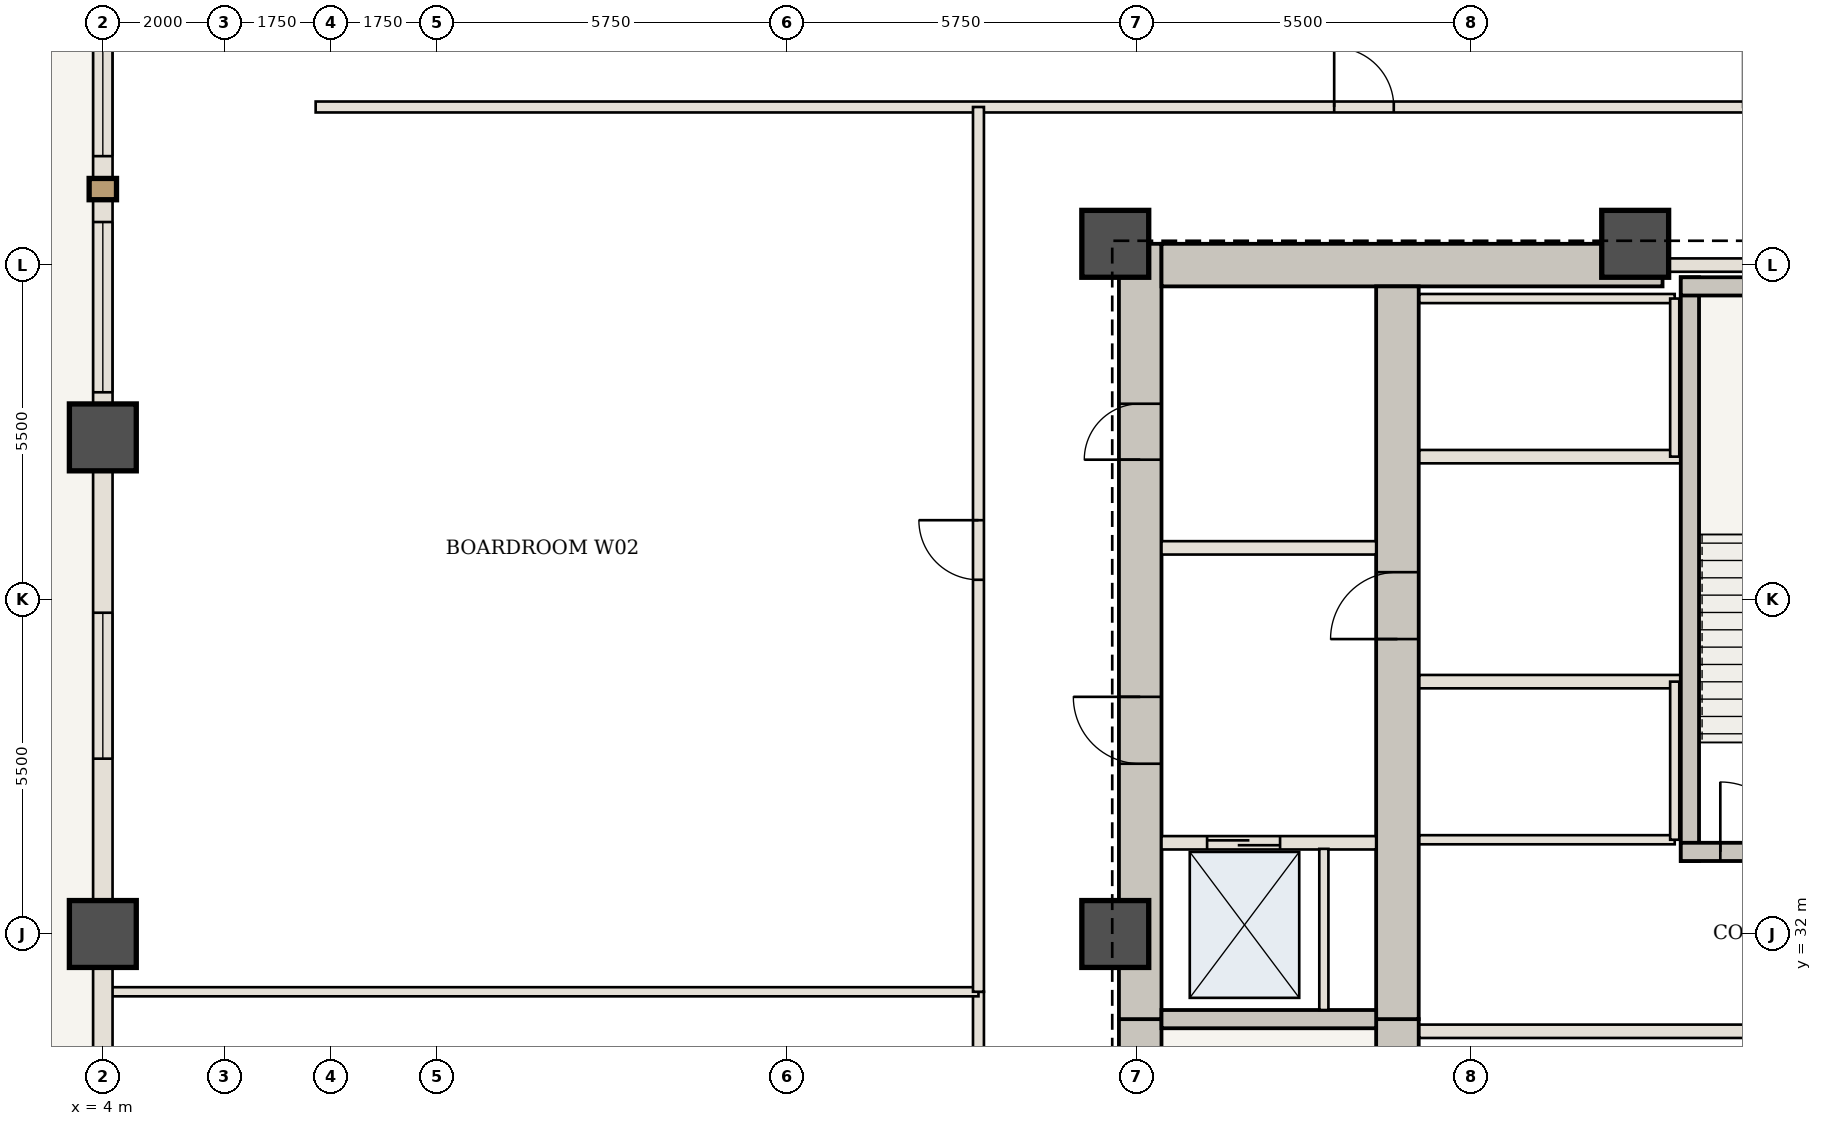
"""IFC4 building model, lengths in metres.
Left out: names, types, materials, properties, quantities, classifications, styles, units other than length and angle.
Written with IfcOpenShell. Run it as: python <this file> out.ifc"""

import sys

from ifc_helpers import new_model, si_unit, direction, frame, frame_2d, origin, origin_2d, place, context, subcontext, project, spatial, rectangle, extrude, element, fill, save


model = new_model("IFC4")
c1 = context("Model", 3, precision=1e-05, world=origin(), true_north=direction((0.0, 1.0)))
c2 = subcontext(c1, "Body", "Model", "MODEL_VIEW")
j1 = project(units=[si_unit("LENGTHUNIT", "METRE"), si_unit("PLANEANGLEUNIT", "RADIAN")], contexts=[c1])
p1 = place(None, origin())
s1 = spatial("IfcSite", under=j1, at=p1, CompositionType="ELEMENT")
p2 = place(p1, origin())
s2 = spatial("IfcBuilding", under=s1, at=p2, CompositionType="ELEMENT")
p3 = place(p2, frame((0.0, 0.0, 34.3)))
s3 = spatial("IfcBuildingStorey", under=s2, at=p3, CompositionType="ELEMENT", Elevation=34.3)
p4 = place(p3, frame((21.06, 20.6, 0.0), z_axis=(0.0, 0.0, 1.0), x_axis=(0.0, 1.0, 0.0)))
e1 = element("IfcWall", 1, at=p4, inside=s3, PredefinedType="SHEAR", context=c2, shape_type="SweptSolid", body=[
    extrude(rectangle(XDim=10.0, YDim=0.7, at=frame_2d((5.0, 0.0))), origin(), (0.0, 0.0, 1.0), 4.55),
])
p5 = place(p4, frame((1.15, 0.0, 0.0)))
e2 = element("IfcOpeningElement", 2, at=p5, cuts=e1, PredefinedType="OPENING", context=c2, shape_type="SweptSolid", body=[
    extrude(rectangle(XDim=1.15, YDim=2.15, at=frame_2d((0.575, 1.075))), frame((0.0, 0.36, 0.0), z_axis=(0.0, -1.0, 0.0), x_axis=(1.0, 0.0, 0.0)), (0.0, 0.0, 1.0), 0.72),
])
p6 = place(p3, frame((21.06, 30.6, 0.0), z_axis=(0.0, 0.0, 1.0), x_axis=(0.0, 1.0, 0.0)))
e3 = element("IfcWall", 3, at=p6, inside=s3, PredefinedType="SHEAR", context=c2, shape_type="SweptSolid", body=[
    extrude(rectangle(XDim=12.75, YDim=0.7, at=frame_2d((6.375, 0.0))), origin(), (0.0, 0.0, 1.0), 4.55),
])
p7 = place(p6, frame((4.2, 0.0, 0.0)))
e4 = element("IfcOpeningElement", 4, at=p7, cuts=e3, PredefinedType="OPENING", context=c2, shape_type="SweptSolid", body=[
    extrude(rectangle(XDim=1.1, YDim=2.15, at=frame_2d((0.55, 1.075))), frame((0.0, 0.36, 0.0), z_axis=(0.0, -1.0, 0.0), x_axis=(1.0, 0.0, 0.0)), (0.0, 0.0, 1.0), 0.72),
])
p8 = place(p6, frame((9.2, 0.0, 0.0)))
e5 = element("IfcOpeningElement", 5, at=p8, cuts=e3, PredefinedType="OPENING", context=c2, shape_type="SweptSolid", body=[
    extrude(rectangle(XDim=0.92, YDim=2.1, at=frame_2d((0.46, 1.05))), frame((0.0, 0.36, 0.0), z_axis=(0.0, -1.0, 0.0), x_axis=(1.0, 0.0, 0.0)), (0.0, 0.0, 1.0), 0.72),
])
p9 = place(p3, frame((21.41, 43.0, 0.0), z_axis=(0.0, 0.0, 1.0), x_axis=(1.0, 0.0, 0.0)))
e6 = element("IfcWall", 6, at=p9, inside=s3, PredefinedType="SHEAR", context=c2, shape_type="SweptSolid", body=[
    extrude(rectangle(XDim=8.24, YDim=0.7, at=frame_2d((4.12, 0.0))), origin(), (0.0, 0.0, 1.0), 4.55),
])
p10 = place(p3, frame((25.29, 21.3, 0.0), z_axis=(0.0, 0.0, 1.0), x_axis=(0.0, 1.0, 0.0)))
e7 = element("IfcWall", 7, at=p10, inside=s3, PredefinedType="SHEAR", context=c2, shape_type="SweptSolid", body=[
    extrude(rectangle(XDim=9.3, YDim=0.7, at=frame_2d((4.65, 0.0))), origin(), (0.0, 0.0, 1.0), 4.55),
])
p11 = place(p3, frame((25.29, 30.6, 0.0), z_axis=(0.0, 0.0, 1.0), x_axis=(0.0, 1.0, 0.0)))
e8 = element("IfcWall", 8, at=p11, inside=s3, PredefinedType="SHEAR", context=c2, shape_type="SweptSolid", body=[
    extrude(rectangle(XDim=12.05, YDim=0.7, at=frame_2d((6.025, 0.0))), origin(), (0.0, 0.0, 1.0), 4.55),
])
p12 = place(p11, frame((6.25, 0.0, 0.0)))
e9 = element("IfcOpeningElement", 9, at=p12, cuts=e8, PredefinedType="OPENING", context=c2, shape_type="SweptSolid", body=[
    extrude(rectangle(XDim=1.1, YDim=2.15, at=frame_2d((0.55, 1.075))), frame((0.0, 0.36, 0.0), z_axis=(0.0, -1.0, 0.0), x_axis=(1.0, 0.0, 0.0)), (0.0, 0.0, 1.0), 0.72),
])
for number, where, z_axis, x_axis in (
    (10, (29.2, 43.35, 0.0), (0.0, 0.0, 1.0), (1.0, 0.0, 0.0)),
    (11, (20.65, 43.35, 0.0), (0.0, 0.0, 1.0), (1.0, 0.0, 0.0)),
    (12, (20.65, 32.0, 0.0), (0.0, 0.0, 1.0), (1.0, 0.0, 0.0)),
):
    element("IfcColumn", number, at=place(p3, frame(where, z_axis=z_axis, x_axis=x_axis)), inside=s3, PredefinedType="COLUMN", context=c2, shape_type="SweptSolid", body=[
        extrude(rectangle(XDim=1.1, YDim=1.1, at=origin_2d()), origin(), (0.0, 0.0, 1.0), 4.55),
    ])
for number, where, z_axis, x_axis in (
    (13, (4.0, 32.0, -0.42), (0.0, 0.0, 1.0), (1.0, 0.0, 0.0)),
    (14, (4.0, 40.167, -0.42), (0.0, 0.0, 1.0), (1.0, 0.0, 0.0)),
):
    element("IfcColumn", number, at=place(p3, frame(where, z_axis=z_axis, x_axis=x_axis)), inside=s3, PredefinedType="COLUMN", context=c2, shape_type="SweptSolid", body=[
        extrude(rectangle(XDim=1.1, YDim=1.1, at=origin_2d()), origin(), (0.0, 0.0, 1.0), 4.97),
    ])
p13 = place(p3, frame((21.41, 30.6, 0.0), z_axis=(0.0, 0.0, 1.0), x_axis=(1.0, 0.0, 0.0)))
e15 = element("IfcWall", 15, at=p13, inside=s3, PredefinedType="SHEAR", context=c2, shape_type="SweptSolid", body=[
    extrude(rectangle(XDim=3.53, YDim=0.3, at=frame_2d((1.765, 0.0))), origin(), (0.0, 0.0, 1.0), 4.13),
])
p14 = place(p3, frame((21.41, 33.5, 0.0), z_axis=(0.0, 0.0, 1.0), x_axis=(1.0, 0.0, 0.0)))
e16 = element("IfcWall", 16, at=p14, inside=s3, PredefinedType="STANDARD", context=c2, shape_type="SweptSolid", body=[
    extrude(rectangle(XDim=3.53, YDim=0.22, at=frame_2d((1.765, 0.0))), origin(), (0.0, 0.0, 1.0), 4.13),
])
p15 = place(p14, frame((0.75, 0.0, 0.0)))
e17 = element("IfcOpeningElement", 17, at=p15, cuts=e16, PredefinedType="OPENING", context=c2, shape_type="SweptSolid", body=[
    extrude(rectangle(XDim=1.2, YDim=2.2, at=frame_2d((0.6, 1.1))), frame((0.0, 0.12, 0.0), z_axis=(0.0, -1.0, 0.0), x_axis=(1.0, 0.0, 0.0)), (0.0, 0.0, 1.0), 0.24),
])
p16 = place(p3, frame((24.08, 30.75, 0.0), z_axis=(0.0, 0.0, 1.0), x_axis=(0.0, 1.0, 0.0)))
e18 = element("IfcWall", 18, at=p16, inside=s3, PredefinedType="STANDARD", context=c2, shape_type="SweptSolid", body=[
    extrude(rectangle(XDim=2.65, YDim=0.15, at=frame_2d((1.325, 0.0))), origin(), (0.0, 0.0, 1.0), 4.13),
])
p17 = place(p3, frame((21.41, 38.35, 0.0), z_axis=(0.0, 0.0, 1.0), x_axis=(1.0, 0.0, 0.0)))
e19 = element("IfcWall", 19, at=p17, inside=s3, PredefinedType="STANDARD", context=c2, shape_type="SweptSolid", body=[
    extrude(rectangle(XDim=3.53, YDim=0.22, at=frame_2d((1.765, 0.0))), origin(), (0.0, 0.0, 1.0), 4.13),
])
p18 = place(p3, frame((25.65, 30.4, 0.0), z_axis=(0.0, 0.0, 1.0), x_axis=(1.0, 0.0, 0.0)))
e20 = element("IfcWall", 20, at=p18, inside=s3, PredefinedType="STANDARD", context=c2, shape_type="SweptSolid", body=[
    extrude(rectangle(XDim=9.25, YDim=0.22, at=frame_2d((4.625, 0.0))), origin(), (0.0, 0.0, 1.0), 4.13),
])
p19 = place(p3, frame((25.65, 36.15, 0.0), z_axis=(0.0, 0.0, 1.0), x_axis=(1.0, 0.0, 0.0)))
e21 = element("IfcWall", 21, at=p19, inside=s3, PredefinedType="STANDARD", context=c2, shape_type="SweptSolid", body=[
    extrude(rectangle(XDim=4.3, YDim=0.22, at=frame_2d((2.15, 0.0))), origin(), (0.0, 0.0, 1.0), 4.13),
])
p20 = place(p3, frame((25.65, 33.55, 0.0), z_axis=(0.0, 0.0, 1.0), x_axis=(1.0, 0.0, 0.0)))
e22 = element("IfcWall", 22, at=p20, inside=s3, PredefinedType="STANDARD", context=c2, shape_type="SweptSolid", body=[
    extrude(rectangle(XDim=4.2, YDim=0.15, at=frame_2d((2.1, 0.0))), origin(), (0.0, 0.0, 1.0), 4.13),
])
p21 = place(p3, frame((29.85, 33.55, 0.0), z_axis=(0.0, 0.0, 1.0), x_axis=(0.0, 1.0, 0.0)))
e23 = element("IfcWall", 23, at=p21, inside=s3, PredefinedType="STANDARD", context=c2, shape_type="SweptSolid", body=[
    extrude(rectangle(XDim=2.6, YDim=0.15, at=frame_2d((1.3, 0.0))), origin(), (0.0, 0.0, 1.0), 4.13),
])
p22 = place(p3, frame((25.65, 39.85, 0.0), z_axis=(0.0, 0.0, 1.0), x_axis=(1.0, 0.0, 0.0)))
e24 = element("IfcWall", 24, at=p22, inside=s3, PredefinedType="STANDARD", context=c2, shape_type="SweptSolid", body=[
    extrude(rectangle(XDim=4.3, YDim=0.22, at=frame_2d((2.15, 0.0))), origin(), (0.0, 0.0, 1.0), 4.13),
])
p23 = place(p3, frame((25.65, 42.45, 0.0), z_axis=(0.0, 0.0, 1.0), x_axis=(1.0, 0.0, 0.0)))
e25 = element("IfcWall", 25, at=p23, inside=s3, PredefinedType="STANDARD", context=c2, shape_type="SweptSolid", body=[
    extrude(rectangle(XDim=4.2, YDim=0.15, at=frame_2d((2.1, 0.0))), origin(), (0.0, 0.0, 1.0), 4.13),
])
p24 = place(p3, frame((29.85, 39.85, 0.0), z_axis=(0.0, 0.0, 1.0), x_axis=(0.0, 1.0, 0.0)))
e26 = element("IfcWall", 26, at=p24, inside=s3, PredefinedType="STANDARD", context=c2, shape_type="SweptSolid", body=[
    extrude(rectangle(XDim=2.6, YDim=0.15, at=frame_2d((1.3, 0.0))), origin(), (0.0, 0.0, 1.0), 4.13),
])
p25 = place(p3, frame((30.1, 33.2, 0.0), z_axis=(0.0, 0.0, 1.0), x_axis=(0.0, 1.0, 0.0)))
e27 = element("IfcWall", 27, at=p25, inside=s3, PredefinedType="SHEAR", context=c2, shape_type="SweptSolid", body=[
    extrude(rectangle(XDim=9.6, YDim=0.3, at=frame_2d((4.8, 0.0))), origin(), (0.0, 0.0, 1.0), 4.13),
])
p26 = place(p3, frame((29.95, 33.35, 0.0), z_axis=(0.0, 0.0, 1.0), x_axis=(1.0, 0.0, 0.0)))
e28 = element("IfcWall", 28, at=p26, inside=s3, PredefinedType="SHEAR", context=c2, shape_type="SweptSolid", body=[
    extrude(rectangle(XDim=4.05, YDim=0.3, at=frame_2d((2.025, 0.0))), origin(), (0.0, 0.0, 1.0), 4.13),
])
p27 = place(p26, frame((0.65, 0.0, 0.0)))
e29 = element("IfcOpeningElement", 29, at=p27, cuts=e28, PredefinedType="OPENING", context=c2, shape_type="SweptSolid", body=[
    extrude(rectangle(XDim=1.15, YDim=2.15, at=frame_2d((0.575, 1.075))), frame((0.0, 0.16, 0.0), z_axis=(0.0, -1.0, 0.0), x_axis=(1.0, 0.0, 0.0)), (0.0, 0.0, 1.0), 0.32),
])
p28 = place(p3, frame((29.95, 42.65, 0.0), z_axis=(0.0, 0.0, 1.0), x_axis=(1.0, 0.0, 0.0)))
e30 = element("IfcWall", 30, at=p28, inside=s3, PredefinedType="SHEAR", context=c2, shape_type="SweptSolid", body=[
    extrude(rectangle(XDim=4.05, YDim=0.3, at=frame_2d((2.025, 0.0))), origin(), (0.0, 0.0, 1.0), 4.13),
])
p29 = place(p3, frame((29.65, 43.0, 0.0), z_axis=(0.0, 0.0, 1.0), x_axis=(1.0, 0.0, 0.0)))
e31 = element("IfcWall", 31, at=p29, inside=s3, PredefinedType="STANDARD", context=c2, shape_type="SweptSolid", body=[
    extrude(rectangle(XDim=8.1, YDim=0.22, at=frame_2d((4.05, 0.0))), origin(), (0.0, 0.0, 1.0), 4.13),
])
p30 = place(p29, frame((5.95, 0.0, 0.0)))
e32 = element("IfcOpeningElement", 32, at=p30, cuts=e31, PredefinedType="OPENING", context=c2, shape_type="SweptSolid", body=[
    extrude(rectangle(XDim=1.1, YDim=2.15, at=frame_2d((0.55, 1.075))), frame((0.0, 0.12, 0.0), z_axis=(0.0, -1.0, 0.0), x_axis=(1.0, 0.0, 0.0)), (0.0, 0.0, 1.0), 0.24),
])
p31 = place(p3, frame((7.5, 45.6, 0.0), z_axis=(0.0, 0.0, 1.0), x_axis=(1.0, 0.0, 0.0)))
e33 = element("IfcWall", 33, at=p31, inside=s3, PredefinedType="STANDARD", context=c2, shape_type="SweptSolid", body=[
    extrude(rectangle(XDim=23.55, YDim=0.18, at=frame_2d((11.775, 0.0))), origin(), (0.0, 0.0, 1.0), 4.13),
])
p32 = place(p31, frame((16.75, 0.0, 0.0)))
e34 = element("IfcOpeningElement", 34, at=p32, cuts=e33, PredefinedType="OPENING", context=c2, shape_type="SweptSolid", body=[
    extrude(rectangle(XDim=0.98, YDim=2.2, at=frame_2d((0.49, 1.1))), frame((0.0, 0.1, 0.0), z_axis=(0.0, -1.0, 0.0), x_axis=(1.0, 0.0, 0.0)), (0.0, 0.0, 1.0), 0.2),
])
p33 = place(p3, frame((18.4, 18.4, 0.0), z_axis=(0.0, 0.0, 1.0), x_axis=(0.0, 1.0, 0.0)))
e35 = element("IfcWall", 35, at=p33, inside=s3, PredefinedType="STANDARD", context=c2, shape_type="SweptSolid", body=[
    extrude(rectangle(XDim=12.65, YDim=0.18, at=frame_2d((6.325, 0.0))), origin(), (0.0, 0.0, 1.0), 4.13),
])
p34 = place(p33, frame((5.825, 0.0, 0.0)))
e36 = element("IfcOpeningElement", 36, at=p34, cuts=e35, PredefinedType="OPENING", context=c2, shape_type="SweptSolid", body=[
    extrude(rectangle(XDim=0.98, YDim=2.2, at=frame_2d((0.49, 1.1))), frame((0.0, 0.1, 0.0), z_axis=(0.0, -1.0, 0.0), x_axis=(1.0, 0.0, 0.0)), (0.0, 0.0, 1.0), 0.2),
])
p35 = place(p3, frame((4.06, 31.05, 0.0), z_axis=(0.0, 0.0, 1.0), x_axis=(1.0, 0.0, 0.0)))
e37 = element("IfcWall", 37, at=p35, inside=s3, PredefinedType="STANDARD", context=c2, shape_type="SweptSolid", body=[
    extrude(rectangle(XDim=14.34, YDim=0.15, at=frame_2d((7.17, 0.0))), origin(), (0.0, 0.0, 1.0), 4.13),
])
p36 = place(p3, frame((18.4, 31.05, 0.0), z_axis=(0.0, 0.0, 1.0), x_axis=(0.0, 1.0, 0.0)))
e38 = element("IfcWall", 38, at=p36, inside=s3, PredefinedType="STANDARD", context=c2, shape_type="SweptSolid", body=[
    extrude(rectangle(XDim=14.55, YDim=0.18, at=frame_2d((7.275, 0.0))), origin(), (0.0, 0.0, 1.0), 4.13),
])
p37 = place(p36, frame((6.775, 0.0, 0.0)))
e39 = element("IfcOpeningElement", 39, at=p37, cuts=e38, PredefinedType="OPENING", context=c2, shape_type="SweptSolid", body=[
    extrude(rectangle(XDim=0.98, YDim=2.2, at=frame_2d((0.49, 1.1))), frame((0.0, 0.1, 0.0), z_axis=(0.0, -1.0, 0.0), x_axis=(1.0, 0.0, 0.0)), (0.0, 0.0, 1.0), 0.2),
])
p38 = place(p3, frame((4.0, 23.833, 0.0), z_axis=(0.0, 0.0, 1.0), x_axis=(0.0, 1.0, 0.0)))
e40 = element("IfcWall", 40, at=p38, inside=s3, PredefinedType="USERDEFINED", context=c2, shape_type="SweptSolid", body=[
    extrude(rectangle(XDim=8.167, YDim=0.32, at=frame_2d((4.083, 0.0))), origin(), (0.0, 0.0, 1.0), 3.33),
])
p39 = place(p38, frame((3.558, 0.0, 0.0)))
e41 = element("IfcOpeningElement", 41, at=p39, cuts=e40, PredefinedType="OPENING", context=c2, shape_type="SweptSolid", body=[
    extrude(rectangle(XDim=1.05, YDim=2.2, at=frame_2d((0.525, 1.1))), frame((0.0, 0.17, 0.0), z_axis=(0.0, -1.0, 0.0), x_axis=(1.0, 0.0, 0.0)), (0.0, 0.0, 1.0), 0.34),
])
p40 = place(p3, frame((4.0, 32.0, 0.0), z_axis=(0.0, 0.0, 1.0), x_axis=(0.0, 1.0, 0.0)))
e42 = element("IfcWall", 42, at=p40, inside=s3, PredefinedType="USERDEFINED", context=c2, shape_type="SweptSolid", body=[
    extrude(rectangle(XDim=8.167, YDim=0.32, at=frame_2d((4.083, 0.0))), origin(), (0.0, 0.0, 1.0), 3.33),
])
p41 = place(p40, frame((2.883, 0.0, 0.85)))
e43 = element("IfcOpeningElement", 43, at=p41, cuts=e42, PredefinedType="OPENING", context=c2, shape_type="SweptSolid", body=[
    extrude(rectangle(XDim=2.4, YDim=1.95, at=frame_2d((1.2, 0.975))), frame((0.0, 0.17, 0.0), z_axis=(0.0, -1.0, 0.0), x_axis=(1.0, 0.0, 0.0)), (0.0, 0.0, 1.0), 0.34),
])
p42 = place(p3, frame((4.0, 40.167, 0.0), z_axis=(0.0, 0.0, 1.0), x_axis=(0.0, 1.0, 0.0)))
e44 = element("IfcWall", 44, at=p42, inside=s3, PredefinedType="USERDEFINED", context=c2, shape_type="SweptSolid", body=[
    extrude(rectangle(XDim=8.167, YDim=0.32, at=frame_2d((4.083, 0.0))), origin(), (0.0, 0.0, 1.0), 3.33),
])
p43 = place(p42, frame((0.742, 0.0, 0.85)))
e45 = element("IfcOpeningElement", 45, at=p43, cuts=e44, PredefinedType="OPENING", context=c2, shape_type="SweptSolid", body=[
    extrude(rectangle(XDim=2.8, YDim=2.05, at=frame_2d((1.4, 1.025))), frame((0.0, 0.17, 0.0), z_axis=(0.0, -1.0, 0.0), x_axis=(1.0, 0.0, 0.0)), (0.0, 0.0, 1.0), 0.34),
])
p44 = place(p42, frame((4.625, 0.0, 0.85)))
e46 = element("IfcOpeningElement", 46, at=p44, cuts=e44, PredefinedType="OPENING", context=c2, shape_type="SweptSolid", body=[
    extrude(rectangle(XDim=2.8, YDim=2.05, at=frame_2d((1.4, 1.025))), frame((0.0, 0.17, 0.0), z_axis=(0.0, -1.0, 0.0), x_axis=(1.0, 0.0, 0.0)), (0.0, 0.0, 1.0), 0.34),
])
p45 = place(p7, origin())
e47 = element("IfcDoor", 47, at=p45, inside=s3, OperationType="SINGLE_SWING_RIGHT", PredefinedType="DOOR", context=c2, shape_type="SweptSolid", body=[
    extrude(rectangle(XDim=1.1, YDim=2.15, at=frame_2d((0.55, 1.075))), frame((0.0, 0.025, 0.0), z_axis=(0.0, -1.0, 0.0), x_axis=(1.0, 0.0, 0.0)), (0.0, 0.0, 1.0), 0.05),
])
fill(e4, e47)
p46 = place(p12, origin())
e48 = element("IfcDoor", 48, at=p46, inside=s3, OperationType="SINGLE_SWING_LEFT", PredefinedType="DOOR", context=c2, shape_type="SweptSolid", body=[
    extrude(rectangle(XDim=1.1, YDim=2.15, at=frame_2d((0.55, 1.075))), frame((0.0, 0.025, 0.0), z_axis=(0.0, -1.0, 0.0), x_axis=(1.0, 0.0, 0.0)), (0.0, 0.0, 1.0), 0.05),
])
fill(e9, e48)
p47 = place(p8, origin())
e49 = element("IfcDoor", 49, at=p47, inside=s3, OperationType="SINGLE_SWING_LEFT", PredefinedType="DOOR", context=c2, shape_type="SweptSolid", body=[
    extrude(rectangle(XDim=0.92, YDim=2.1, at=frame_2d((0.46, 1.05))), frame((0.0, 0.025, 0.0), z_axis=(0.0, -1.0, 0.0), x_axis=(1.0, 0.0, 0.0)), (0.0, 0.0, 1.0), 0.05),
])
fill(e5, e49)
p48 = place(p15, origin())
e50 = element("IfcDoor", 50, at=p48, inside=s3, OperationType="DOUBLE_DOOR_SLIDING", PredefinedType="DOOR", context=c2, shape_type="SweptSolid", body=[
    extrude(rectangle(XDim=1.2, YDim=2.2, at=frame_2d((0.6, 1.1))), frame((0.0, 0.025, 0.0), z_axis=(0.0, -1.0, 0.0), x_axis=(1.0, 0.0, 0.0)), (0.0, 0.0, 1.0), 0.05),
])
fill(e17, e50)
p49 = place(p27, origin())
e51 = element("IfcDoor", 51, at=p49, inside=s3, OperationType="SINGLE_SWING_LEFT", PredefinedType="DOOR", context=c2, shape_type="SweptSolid", body=[
    extrude(rectangle(XDim=1.15, YDim=2.15, at=frame_2d((0.575, 1.075))), frame((0.0, 0.025, 0.0), z_axis=(0.0, -1.0, 0.0), x_axis=(1.0, 0.0, 0.0)), (0.0, 0.0, 1.0), 0.05),
])
fill(e29, e51)
p50 = place(p32, origin())
e52 = element("IfcDoor", 52, at=p50, inside=s3, OperationType="SINGLE_SWING_LEFT", PredefinedType="DOOR", context=c2, shape_type="SweptSolid", body=[
    extrude(rectangle(XDim=0.98, YDim=2.2, at=frame_2d((0.49, 1.1))), frame((0.0, 0.025, 0.0), z_axis=(0.0, -1.0, 0.0), x_axis=(1.0, 0.0, 0.0)), (0.0, 0.0, 1.0), 0.05),
])
fill(e34, e52)
p51 = place(p37, origin())
e53 = element("IfcDoor", 53, at=p51, inside=s3, OperationType="SINGLE_SWING_RIGHT", PredefinedType="DOOR", context=c2, shape_type="SweptSolid", body=[
    extrude(rectangle(XDim=0.98, YDim=2.2, at=frame_2d((0.49, 1.1))), frame((0.0, 0.025, 0.0), z_axis=(0.0, -1.0, 0.0), x_axis=(1.0, 0.0, 0.0)), (0.0, 0.0, 1.0), 0.05),
])
fill(e39, e53)
p52 = place(p41, origin())
e54 = element("IfcWindow", 54, at=p52, inside=s3, PartitioningType="SINGLE_PANEL", PredefinedType="WINDOW", context=c2, shape_type="SweptSolid", body=[
    extrude(rectangle(XDim=2.4, YDim=1.95, at=frame_2d((1.2, 0.975))), frame((0.0, 0.03, 0.0), z_axis=(0.0, -1.0, 0.0), x_axis=(1.0, 0.0, 0.0)), (0.0, 0.0, 1.0), 0.06),
])
fill(e43, e54)
p53 = place(p43, origin())
e55 = element("IfcWindow", 55, at=p53, inside=s3, PartitioningType="SINGLE_PANEL", PredefinedType="WINDOW", context=c2, shape_type="SweptSolid", body=[
    extrude(rectangle(XDim=2.8, YDim=2.05, at=frame_2d((1.4, 1.025))), frame((0.0, 0.03, 0.0), z_axis=(0.0, -1.0, 0.0), x_axis=(1.0, 0.0, 0.0)), (0.0, 0.0, 1.0), 0.06),
])
fill(e45, e55)
p54 = place(p44, origin())
e56 = element("IfcWindow", 56, at=p54, inside=s3, PartitioningType="SINGLE_PANEL", PredefinedType="WINDOW", context=c2, shape_type="SweptSolid", body=[
    extrude(rectangle(XDim=2.8, YDim=2.05, at=frame_2d((1.4, 1.025))), frame((0.0, 0.03, 0.0), z_axis=(0.0, -1.0, 0.0), x_axis=(1.0, 0.0, 0.0)), (0.0, 0.0, 1.0), 0.06),
])
fill(e46, e56)
save(model, sys.argv[1])
